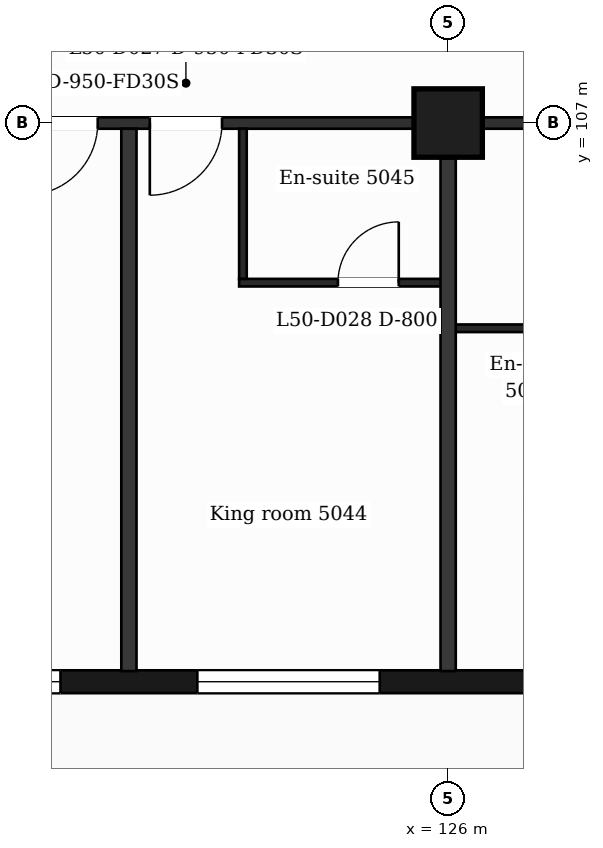
"""IFC4 building model, lengths in metres.
Left out: names, types, materials, properties, quantities, classifications, styles, units other than length and angle.
Written with IfcOpenShell. Run it as: python <this file> out.ifc"""

import sys

from ifc_helpers import new_model, si_unit, direction, frame, frame_2d, origin, origin_2d, place, context, subcontext, project, spatial, rectangle, extrude, element, fill, save


model = new_model("IFC4")
c1 = context("Model", 3, precision=1e-05, world=origin(), true_north=direction((0.0, 1.0)))
c2 = subcontext(c1, "Body", "Model", "MODEL_VIEW")
j1 = project(units=[si_unit("LENGTHUNIT", "METRE"), si_unit("PLANEANGLEUNIT", "RADIAN")], contexts=[c1])
p1 = place(None, origin())
s1 = spatial("IfcSite", under=j1, at=p1, CompositionType="ELEMENT")
p2 = place(p1, origin())
s2 = spatial("IfcBuilding", under=s1, at=p2, CompositionType="ELEMENT")
p3 = place(p2, frame((0.0, 0.0, 209.6)))
s3 = spatial("IfcBuildingStorey", under=s2, at=p3, CompositionType="ELEMENT", Elevation=209.6)
p4 = place(p3, frame((126.0, 107.0, 0.0), z_axis=(0.0, 0.0, 1.0), x_axis=(1.0, 0.0, 0.0)))
e1 = element("IfcColumn", 1, at=p4, inside=s3, PredefinedType="COLUMN", context=c2, shape_type="SweptSolid", body=[
    extrude(rectangle(XDim=0.9, YDim=0.9, at=origin_2d()), origin(), (0.0, 0.0, 1.0), 3.7),
])
p5 = place(p3, frame((89.85, 99.65, 0.0), z_axis=(0.0, 0.0, 1.0), x_axis=(1.0, 0.0, 0.0)))
e2 = element("IfcWall", 2, at=p5, inside=s3, PredefinedType="SOLIDWALL", context=c2, shape_type="SweptSolid", body=[
    extrude(rectangle(XDim=47.25, YDim=0.3, at=frame_2d((23.625, 0.0))), origin(), (0.0, 0.0, 1.0), 3.38),
])
p6 = place(p5, frame((0.725, 0.0, 0.9)))
e3 = element("IfcOpeningElement", 3, at=p6, cuts=e2, PredefinedType="OPENING", context=c2, shape_type="SweptSolid", body=[
    extrude(rectangle(XDim=1.2, YDim=2.1, at=frame_2d((0.6, 1.05))), frame((0.0, 0.16, 0.0), z_axis=(0.0, -1.0, 0.0), x_axis=(1.0, 0.0, 0.0)), (0.0, 0.0, 1.0), 0.32),
])
p7 = place(p5, frame((3.45, 0.0, 0.9)))
e4 = element("IfcOpeningElement", 4, at=p7, cuts=e2, PredefinedType="OPENING", context=c2, shape_type="SweptSolid", body=[
    extrude(rectangle(XDim=2.4, YDim=2.1, at=frame_2d((1.2, 1.05))), frame((0.0, 0.16, 0.0), z_axis=(0.0, -1.0, 0.0), x_axis=(1.0, 0.0, 0.0)), (0.0, 0.0, 1.0), 0.32),
])
p8 = place(p5, frame((8.25, 0.0, 0.9)))
e5 = element("IfcOpeningElement", 5, at=p8, cuts=e2, PredefinedType="OPENING", context=c2, shape_type="SweptSolid", body=[
    extrude(rectangle(XDim=1.2, YDim=2.1, at=frame_2d((0.6, 1.05))), frame((0.0, 0.16, 0.0), z_axis=(0.0, -1.0, 0.0), x_axis=(1.0, 0.0, 0.0)), (0.0, 0.0, 1.0), 0.32),
])
p9 = place(p5, frame((12.45, 0.0, 0.9)))
e6 = element("IfcOpeningElement", 6, at=p9, cuts=e2, PredefinedType="OPENING", context=c2, shape_type="SweptSolid", body=[
    extrude(rectangle(XDim=1.2, YDim=2.1, at=frame_2d((0.6, 1.05))), frame((0.0, 0.16, 0.0), z_axis=(0.0, -1.0, 0.0), x_axis=(1.0, 0.0, 0.0)), (0.0, 0.0, 1.0), 0.32),
])
p10 = place(p5, frame((16.05, 0.0, 0.9)))
e7 = element("IfcOpeningElement", 7, at=p10, cuts=e2, PredefinedType="OPENING", context=c2, shape_type="SweptSolid", body=[
    extrude(rectangle(XDim=2.4, YDim=2.1, at=frame_2d((1.2, 1.05))), frame((0.0, 0.16, 0.0), z_axis=(0.0, -1.0, 0.0), x_axis=(1.0, 0.0, 0.0)), (0.0, 0.0, 1.0), 0.32),
])
p11 = place(p5, frame((20.25, 0.0, 0.9)))
e8 = element("IfcOpeningElement", 8, at=p11, cuts=e2, PredefinedType="OPENING", context=c2, shape_type="SweptSolid", body=[
    extrude(rectangle(XDim=2.4, YDim=2.1, at=frame_2d((1.2, 1.05))), frame((0.0, 0.16, 0.0), z_axis=(0.0, -1.0, 0.0), x_axis=(1.0, 0.0, 0.0)), (0.0, 0.0, 1.0), 0.32),
])
p12 = place(p5, frame((25.05, 0.0, 0.0)))
e9 = element("IfcOpeningElement", 9, at=p12, cuts=e2, PredefinedType="OPENING", context=c2, shape_type="SweptSolid", body=[
    extrude(rectangle(XDim=1.2, YDim=2.4, at=frame_2d((0.6, 1.2))), frame((0.0, 0.16, 0.0), z_axis=(0.0, -1.0, 0.0), x_axis=(1.0, 0.0, 0.0)), (0.0, 0.0, 1.0), 0.32),
])
p13 = place(p5, frame((28.65, 0.0, 0.9)))
e10 = element("IfcOpeningElement", 10, at=p13, cuts=e2, PredefinedType="OPENING", context=c2, shape_type="SweptSolid", body=[
    extrude(rectangle(XDim=2.4, YDim=2.1, at=frame_2d((1.2, 1.05))), frame((0.0, 0.16, 0.0), z_axis=(0.0, -1.0, 0.0), x_axis=(1.0, 0.0, 0.0)), (0.0, 0.0, 1.0), 0.32),
])
p14 = place(p5, frame((32.85, 0.0, 0.9)))
e11 = element("IfcOpeningElement", 11, at=p14, cuts=e2, PredefinedType="OPENING", context=c2, shape_type="SweptSolid", body=[
    extrude(rectangle(XDim=2.4, YDim=2.1, at=frame_2d((1.2, 1.05))), frame((0.0, 0.16, 0.0), z_axis=(0.0, -1.0, 0.0), x_axis=(1.0, 0.0, 0.0)), (0.0, 0.0, 1.0), 0.32),
])
p15 = place(p5, frame((37.65, 0.0, 0.9)))
e12 = element("IfcOpeningElement", 12, at=p15, cuts=e2, PredefinedType="OPENING", context=c2, shape_type="SweptSolid", body=[
    extrude(rectangle(XDim=1.2, YDim=2.1, at=frame_2d((0.6, 1.05))), frame((0.0, 0.16, 0.0), z_axis=(0.0, -1.0, 0.0), x_axis=(1.0, 0.0, 0.0)), (0.0, 0.0, 1.0), 0.32),
])
p16 = place(p5, frame((41.85, 0.0, 0.9)))
e13 = element("IfcOpeningElement", 13, at=p16, cuts=e2, PredefinedType="OPENING", context=c2, shape_type="SweptSolid", body=[
    extrude(rectangle(XDim=1.2, YDim=2.1, at=frame_2d((0.6, 1.05))), frame((0.0, 0.16, 0.0), z_axis=(0.0, -1.0, 0.0), x_axis=(1.0, 0.0, 0.0)), (0.0, 0.0, 1.0), 0.32),
])
p17 = place(p5, frame((45.25, 0.0, 0.9)))
e14 = element("IfcOpeningElement", 14, at=p17, cuts=e2, PredefinedType="OPENING", context=c2, shape_type="SweptSolid", body=[
    extrude(rectangle(XDim=1.2, YDim=2.1, at=frame_2d((0.6, 1.05))), frame((0.0, 0.16, 0.0), z_axis=(0.0, -1.0, 0.0), x_axis=(1.0, 0.0, 0.0)), (0.0, 0.0, 1.0), 0.32),
])
p18 = place(p3, frame((126.0, 104.3, 0.0), z_axis=(0.0, 0.0, 1.0), x_axis=(1.0, 0.0, 0.0)))
e15 = element("IfcWall", 15, at=p18, inside=s3, PredefinedType="PARTITIONING", context=c2, shape_type="SweptSolid", body=[
    extrude(rectangle(XDim=2.15, YDim=0.1, at=frame_2d((1.075, 0.0))), origin(), (0.0, 0.0, 1.0), 3.38),
])
p19 = place(p3, frame((123.25, 104.9, 0.0), z_axis=(0.0, 0.0, 1.0), x_axis=(1.0, 0.0, 0.0)))
e16 = element("IfcWall", 16, at=p19, inside=s3, PredefinedType="PARTITIONING", context=c2, shape_type="SweptSolid", body=[
    extrude(rectangle(XDim=2.75, YDim=0.1, at=frame_2d((1.375, 0.0))), origin(), (0.0, 0.0, 1.0), 3.38),
])
p20 = place(p19, frame((1.3, 0.0, 0.0)))
e17 = element("IfcOpeningElement", 17, at=p20, cuts=e16, PredefinedType="OPENING", context=c2, shape_type="SweptSolid", body=[
    extrude(rectangle(XDim=0.8, YDim=2.1, at=frame_2d((0.4, 1.05))), frame((0.0, 0.06, 0.0), z_axis=(0.0, -1.0, 0.0), x_axis=(1.0, 0.0, 0.0)), (0.0, 0.0, 1.0), 0.12),
])
p21 = place(p3, frame((87.018, 107.0, 0.0), z_axis=(0.0, 0.0, 1.0), x_axis=(1.0, 0.0, 0.0)))
e18 = element("IfcWall", 18, at=p21, inside=s3, PredefinedType="PARTITIONING", context=c2, shape_type="SweptSolid", body=[
    extrude(rectangle(XDim=52.765, YDim=0.15, at=frame_2d((26.382, 0.0))), origin(), (0.0, 0.0, 1.0), 3.38),
])
p22 = place(p21, frame((1.276, 0.0, 0.0)))
e19 = element("IfcOpeningElement", 19, at=p22, cuts=e18, PredefinedType="OPENING", context=c2, shape_type="SweptSolid", body=[
    extrude(rectangle(XDim=0.95, YDim=2.1, at=frame_2d((0.475, 1.05))), frame((0.0, 0.085, 0.0), z_axis=(0.0, -1.0, 0.0), x_axis=(1.0, 0.0, 0.0)), (0.0, 0.0, 1.0), 0.17),
])
p23 = place(p21, frame((6.034, 0.0, 0.0)))
e20 = element("IfcOpeningElement", 20, at=p23, cuts=e18, PredefinedType="OPENING", context=c2, shape_type="SweptSolid", body=[
    extrude(rectangle(XDim=0.95, YDim=2.1, at=frame_2d((0.475, 1.05))), frame((0.0, 0.085, 0.0), z_axis=(0.0, -1.0, 0.0), x_axis=(1.0, 0.0, 0.0)), (0.0, 0.0, 1.0), 0.17),
])
p24 = place(p21, frame((15.445, 0.0, 0.0)))
e21 = element("IfcOpeningElement", 21, at=p24, cuts=e18, PredefinedType="OPENING", context=c2, shape_type="SweptSolid", body=[
    extrude(rectangle(XDim=0.95, YDim=2.1, at=frame_2d((0.475, 1.05))), frame((0.0, 0.085, 0.0), z_axis=(0.0, -1.0, 0.0), x_axis=(1.0, 0.0, 0.0)), (0.0, 0.0, 1.0), 0.17),
])
p25 = place(p21, frame((18.369, 0.0, 0.0)))
e22 = element("IfcOpeningElement", 22, at=p25, cuts=e18, PredefinedType="OPENING", context=c2, shape_type="SweptSolid", body=[
    extrude(rectangle(XDim=0.95, YDim=2.1, at=frame_2d((0.475, 1.05))), frame((0.0, 0.085, 0.0), z_axis=(0.0, -1.0, 0.0), x_axis=(1.0, 0.0, 0.0)), (0.0, 0.0, 1.0), 0.17),
])
p26 = place(p21, frame((24.519, 0.0, 0.0)))
e23 = element("IfcOpeningElement", 23, at=p26, cuts=e18, PredefinedType="OPENING", context=c2, shape_type="SweptSolid", body=[
    extrude(rectangle(XDim=0.95, YDim=2.1, at=frame_2d((0.475, 1.05))), frame((0.0, 0.085, 0.0), z_axis=(0.0, -1.0, 0.0), x_axis=(1.0, 0.0, 0.0)), (0.0, 0.0, 1.0), 0.17),
])
p27 = place(p21, frame((26.632, 0.0, 0.0)))
e24 = element("IfcOpeningElement", 24, at=p27, cuts=e18, PredefinedType="OPENING", context=c2, shape_type="SweptSolid", body=[
    extrude(rectangle(XDim=1.0, YDim=2.1, at=frame_2d((0.5, 1.05))), frame((0.0, 0.085, 0.0), z_axis=(0.0, -1.0, 0.0), x_axis=(1.0, 0.0, 0.0)), (0.0, 0.0, 1.0), 0.17),
])
p28 = place(p21, frame((33.422, 0.0, 0.0)))
e25 = element("IfcOpeningElement", 25, at=p28, cuts=e18, PredefinedType="OPENING", context=c2, shape_type="SweptSolid", body=[
    extrude(rectangle(XDim=0.95, YDim=2.1, at=frame_2d((0.475, 1.05))), frame((0.0, 0.085, 0.0), z_axis=(0.0, -1.0, 0.0), x_axis=(1.0, 0.0, 0.0)), (0.0, 0.0, 1.0), 0.17),
])
p29 = place(p21, frame((35.057, 0.0, 0.0)))
e26 = element("IfcOpeningElement", 26, at=p29, cuts=e18, PredefinedType="OPENING", context=c2, shape_type="SweptSolid", body=[
    extrude(rectangle(XDim=0.95, YDim=2.1, at=frame_2d((0.475, 1.05))), frame((0.0, 0.085, 0.0), z_axis=(0.0, -1.0, 0.0), x_axis=(1.0, 0.0, 0.0)), (0.0, 0.0, 1.0), 0.17),
])
p30 = place(p21, frame((44.532, 0.0, 0.0)))
e27 = element("IfcOpeningElement", 27, at=p30, cuts=e18, PredefinedType="OPENING", context=c2, shape_type="SweptSolid", body=[
    extrude(rectangle(XDim=1.0, YDim=2.1, at=frame_2d((0.5, 1.05))), frame((0.0, 0.085, 0.0), z_axis=(0.0, -1.0, 0.0), x_axis=(1.0, 0.0, 0.0)), (0.0, 0.0, 1.0), 0.17),
])
p31 = place(p21, frame((48.249, 0.0, 0.0)))
e28 = element("IfcOpeningElement", 28, at=p31, cuts=e18, PredefinedType="OPENING", context=c2, shape_type="SweptSolid", body=[
    extrude(rectangle(XDim=0.95, YDim=2.1, at=frame_2d((0.475, 1.05))), frame((0.0, 0.085, 0.0), z_axis=(0.0, -1.0, 0.0), x_axis=(1.0, 0.0, 0.0)), (0.0, 0.0, 1.0), 0.17),
])
p32 = place(p3, frame((121.8, 99.79, 0.0), z_axis=(0.0, 0.0, 1.0), x_axis=(0.0, 1.0, 0.0)))
e29 = element("IfcWall", 29, at=p32, inside=s3, PredefinedType="PARTITIONING", context=c2, shape_type="SweptSolid", body=[
    extrude(rectangle(XDim=7.135, YDim=0.2, at=frame_2d((3.567, 0.0))), origin(), (0.0, 0.0, 1.0), 3.38),
])
p33 = place(p3, frame((123.3, 104.95, 0.0), z_axis=(0.0, 0.0, 1.0), x_axis=(0.0, 1.0, 0.0)))
e30 = element("IfcWall", 30, at=p33, inside=s3, PredefinedType="PARTITIONING", context=c2, shape_type="SweptSolid", body=[
    extrude(rectangle(XDim=1.975, YDim=0.1, at=frame_2d((0.988, 0.0))), origin(), (0.0, 0.0, 1.0), 3.38),
])
p34 = place(p3, frame((126.0, 99.79, 0.0), z_axis=(0.0, 0.0, 1.0), x_axis=(0.0, 1.0, 0.0)))
e31 = element("IfcWall", 31, at=p34, inside=s3, PredefinedType="PARTITIONING", context=c2, shape_type="SweptSolid", body=[
    extrude(rectangle(XDim=7.135, YDim=0.2, at=frame_2d((3.567, 0.0))), origin(), (0.0, 0.0, 1.0), 3.38),
])
p35 = place(p13, origin())
e32 = element("IfcWindow", 32, at=p35, inside=s3, PartitioningType="SINGLE_PANEL", PredefinedType="WINDOW", context=c2, shape_type="SweptSolid", body=[
    extrude(rectangle(XDim=2.4, YDim=2.1, at=frame_2d((1.2, 1.05))), frame((0.0, 0.03, 0.0), z_axis=(0.0, -1.0, 0.0), x_axis=(1.0, 0.0, 0.0)), (0.0, 0.0, 1.0), 0.06),
])
fill(e10, e32)
p36 = place(p14, origin())
e33 = element("IfcWindow", 33, at=p36, inside=s3, PartitioningType="SINGLE_PANEL", PredefinedType="WINDOW", context=c2, shape_type="SweptSolid", body=[
    extrude(rectangle(XDim=2.4, YDim=2.1, at=frame_2d((1.2, 1.05))), frame((0.0, 0.03, 0.0), z_axis=(0.0, -1.0, 0.0), x_axis=(1.0, 0.0, 0.0)), (0.0, 0.0, 1.0), 0.06),
])
fill(e11, e33)
p37 = place(p28, origin())
e34 = element("IfcDoor", 34, at=p37, inside=s3, OperationType="SINGLE_SWING_LEFT", PredefinedType="DOOR", context=c2, shape_type="SweptSolid", body=[
    extrude(rectangle(XDim=0.95, YDim=2.1, at=frame_2d((0.475, 1.05))), frame((0.0, 0.025, 0.0), z_axis=(0.0, -1.0, 0.0), x_axis=(1.0, 0.0, 0.0)), (0.0, 0.0, 1.0), 0.05),
])
fill(e25, e34)
p38 = place(p29, origin())
e35 = element("IfcDoor", 35, at=p38, inside=s3, OperationType="SINGLE_SWING_LEFT", PredefinedType="DOOR", context=c2, shape_type="SweptSolid", body=[
    extrude(rectangle(XDim=0.95, YDim=2.1, at=frame_2d((0.475, 1.05))), frame((0.0, 0.025, 0.0), z_axis=(0.0, -1.0, 0.0), x_axis=(1.0, 0.0, 0.0)), (0.0, 0.0, 1.0), 0.05),
])
fill(e26, e35)
p39 = place(p20, origin())
e36 = element("IfcDoor", 36, at=p39, inside=s3, OperationType="SINGLE_SWING_RIGHT", PredefinedType="DOOR", context=c2, shape_type="SweptSolid", body=[
    extrude(rectangle(XDim=0.8, YDim=2.1, at=frame_2d((0.4, 1.05))), frame((0.0, 0.025, 0.0), z_axis=(0.0, -1.0, 0.0), x_axis=(1.0, 0.0, 0.0)), (0.0, 0.0, 1.0), 0.05),
])
fill(e17, e36)
save(model, sys.argv[1])
